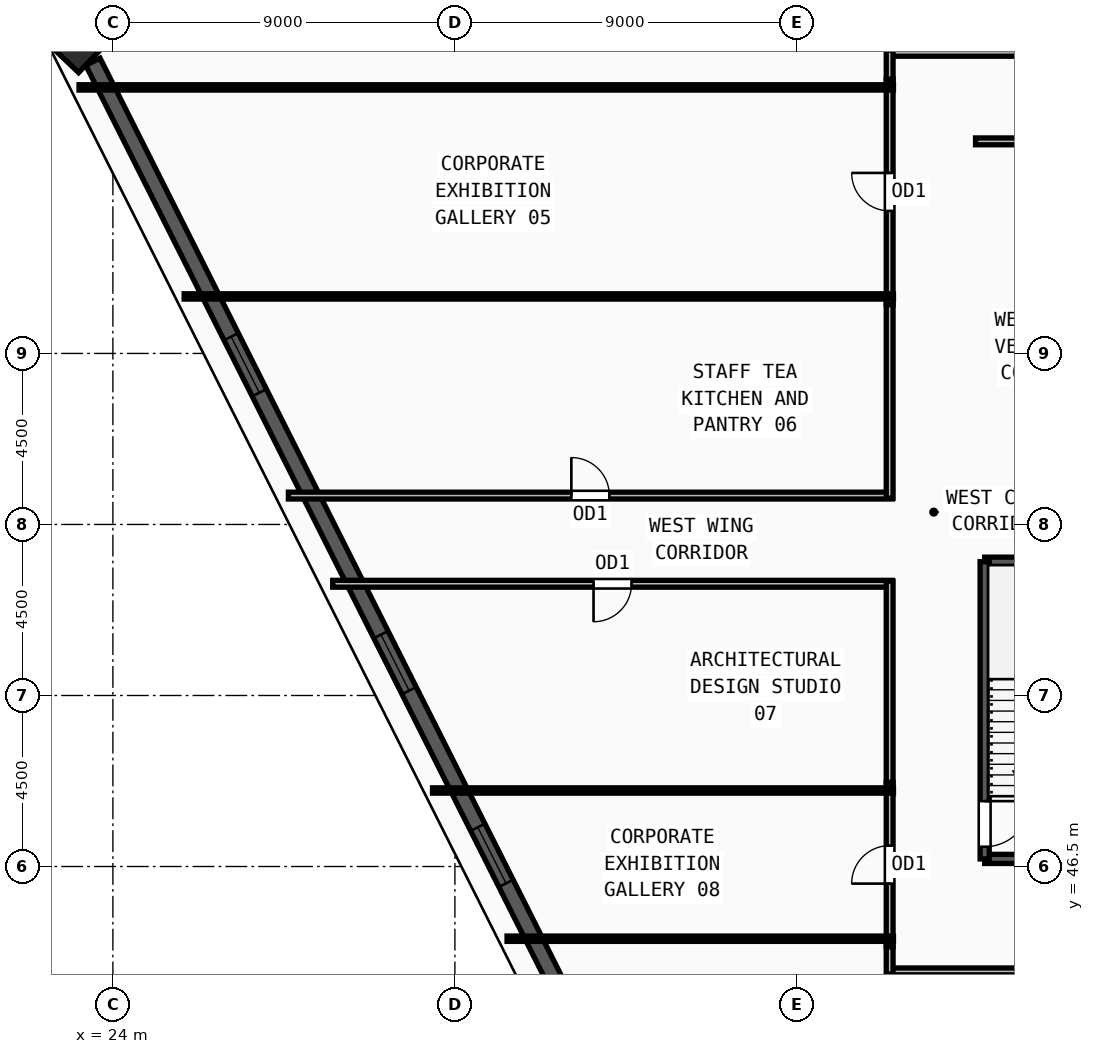
"""IFC4 building model, lengths in metres.
Left out: names, types, materials, properties, quantities, classifications, styles, units other than length and angle.
Written with IfcOpenShell. Run it as: python <this file> out.ifc"""

import sys

from ifc_helpers import new_model, si_unit, direction, frame, frame_2d, origin, origin_2d, place, context, subcontext, project, spatial, rectangle, extrude, source, transform, mapped, element, fill, save


model = new_model("IFC4")
c1 = context("Model", 3, precision=1e-05, world=origin(), true_north=direction((0.0, 1.0)))
c2 = subcontext(c1, "Body", "Model", "MODEL_VIEW")
j1 = project(units=[si_unit("LENGTHUNIT", "METRE"), si_unit("PLANEANGLEUNIT", "RADIAN")], contexts=[c1])
p1 = place(None, origin())
s1 = spatial("IfcSite", under=j1, at=p1, CompositionType="ELEMENT")
p2 = place(p1, origin())
s2 = spatial("IfcBuilding", under=s1, at=p2, CompositionType="ELEMENT")
p3 = place(p2, frame((0.0, 0.0, 102.0)))
s3 = spatial("IfcBuildingStorey", under=s2, at=p3, CompositionType="ELEMENT", Elevation=102.0)
m1 = source(origin(), c2, "Body", "SweptSolid", [
    extrude(rectangle(XDim=1.4, YDim=1.15, at=origin_2d()), origin(), (0.0, 0.0, 1.0), 3.75),
])
p4 = place(p3, frame((23.164, 68.293, 0.0), z_axis=(0.0, 0.0, 1.0), x_axis=(0.68936671806, 0.724412539946, 0.0)))
e1 = element("IfcColumn", 1, at=p4, inside=s3, PredefinedType="COLUMN", context=c2, shape_type="MappedRepresentation", body=[
    mapped(m1, transform((0.0, 0.0, 0.0), x_axis=(1.0, 0.0, 0.0), y_axis=(0.0, 1.0, 0.0), z_axis=(0.0, 0.0, 1.0), scale=1.0)),
])
p5 = place(p3, frame((23.474, 67.677, 0.0), z_axis=(0.0, 0.0, 1.0), x_axis=(0.44918995427, -0.893436279196, 0.0)))
e2 = element("IfcWall", 2, at=p5, inside=s3, PredefinedType="SOLIDWALL", context=c2, shape_type="SweptSolid", body=[
    extrude(rectangle(XDim=32.298, YDim=0.42, at=frame_2d((16.149, 0.0))), origin(), (0.0, 0.0, 1.0), 3.57),
])
m2 = source(origin(), c2, "Body", "SweptSolid", [
    extrude(rectangle(XDim=1.65, YDim=1.95, at=frame_2d((0.825, 0.975))), frame((0.0, 0.22, 0.0), z_axis=(0.0, -1.0, 0.0), x_axis=(1.0, 0.0, 0.0)), (0.0, 0.0, 1.0), 0.44),
])
p6 = place(p5, frame((8.099, 0.0, 0.55)))
e3 = element("IfcOpeningElement", 3, at=p6, cuts=e2, PredefinedType="OPENING", context=c2, shape_type="MappedRepresentation", body=[
    mapped(m2, transform((0.0, 0.0, 0.0), x_axis=(1.0, 0.0, 0.0), y_axis=(0.0, 1.0, 0.0), z_axis=(0.0, 0.0, 1.0), scale=1.0)),
])
p7 = place(p5, frame((16.874, 0.0, 0.55)))
e4 = element("IfcOpeningElement", 4, at=p7, cuts=e2, PredefinedType="OPENING", context=c2, shape_type="MappedRepresentation", body=[
    mapped(m2, transform((0.0, 0.0, 0.0), x_axis=(1.0, 0.0, 0.0), y_axis=(0.0, 1.0, 0.0), z_axis=(0.0, 0.0, 1.0), scale=1.0)),
])
p8 = place(p5, frame((22.548, 0.0, 0.55)))
e5 = element("IfcOpeningElement", 5, at=p8, cuts=e2, PredefinedType="OPENING", context=c2, shape_type="MappedRepresentation", body=[
    mapped(m2, transform((0.0, 0.0, 0.0), x_axis=(1.0, 0.0, 0.0), y_axis=(0.0, 1.0, 0.0), z_axis=(0.0, 0.0, 1.0), scale=1.0)),
])
for number, where, z_axis, x_axis in (
    (6, (46.94, 46.7, 0.0), (0.0, 0.0, 1.0), (1.0, 0.0, 0.0)),
    (7, (50.38, 54.52, 0.0), (0.0, 0.0, 1.0), (-1.0, 0.0, 0.0)),
):
    element("IfcWall", number, at=place(p3, frame(where, z_axis=z_axis, x_axis=x_axis)), inside=s3, PredefinedType="SOLIDWALL", context=c2, shape_type="SweptSolid", body=[
        extrude(rectangle(XDim=3.44, YDim=0.24, at=frame_2d((1.72, 0.0))), origin(), (0.0, 0.0, 1.0), 3.57),
    ])
p9 = place(p3, frame((46.94, 54.52, 0.0), z_axis=(0.0, 0.0, 1.0), x_axis=(0.0, -1.0, 0.0)))
e8 = element("IfcWall", 8, at=p9, inside=s3, PredefinedType="SOLIDWALL", context=c2, shape_type="SweptSolid", body=[
    extrude(rectangle(XDim=7.82, YDim=0.24, at=frame_2d((3.91, 0.0))), origin(), (0.0, 0.0, 1.0), 3.57),
])
m3 = source(origin(), c2, "Body", "SweptSolid", [
    extrude(rectangle(XDim=1.2, YDim=2.2, at=frame_2d((0.6, 1.1))), frame((0.0, 0.13, 0.0), z_axis=(0.0, -1.0, 0.0), x_axis=(1.0, 0.0, 0.0)), (0.0, 0.0, 1.0), 0.26),
])
p10 = place(p9, frame((6.3, 0.0, 0.0)))
e9 = element("IfcOpeningElement", 9, at=p10, cuts=e8, PredefinedType="OPENING", context=c2, shape_type="MappedRepresentation", body=[
    mapped(m3, transform((0.0, 0.0, 0.0), x_axis=(1.0, 0.0, 0.0), y_axis=(0.0, 1.0, 0.0), z_axis=(0.0, 0.0, 1.0), scale=1.0)),
])
p11 = place(p3, frame((46.7, 65.58, 0.0), z_axis=(0.0, 0.0, 1.0), x_axis=(1.0, 0.0, 0.0)))
e10 = element("IfcWall", 10, at=p11, inside=s3, PredefinedType="PARTITIONING", context=c2, shape_type="SweptSolid", body=[
    extrude(rectangle(XDim=3.84, YDim=0.18, at=frame_2d((1.92, 0.0))), origin(), (0.0, 0.0, 1.0), 3.57),
])
m4 = source(origin(), c2, "Body", "SweptSolid", [
    extrude(rectangle(XDim=1.3, YDim=2.2, at=frame_2d((0.65, 1.1))), frame((0.0, 0.1, 0.0), z_axis=(0.0, -1.0, 0.0), x_axis=(1.0, 0.0, 0.0)), (0.0, 0.0, 1.0), 0.2),
])
p12 = place(p11, frame((1.27, 0.0, 0.0)))
e11 = element("IfcOpeningElement", 11, at=p12, cuts=e10, PredefinedType="OPENING", context=c2, shape_type="MappedRepresentation", body=[
    mapped(m4, transform((0.0, 0.0, 0.0), x_axis=(1.0, 0.0, 0.0), y_axis=(0.0, 1.0, 0.0), z_axis=(0.0, 0.0, 1.0), scale=1.0)),
])
p13 = place(p3, frame((44.37, 67.91, 0.0), z_axis=(0.0, 0.0, 1.0), x_axis=(1.0, 0.0, 0.0)))
e12 = element("IfcWall", 12, at=p13, inside=s3, PredefinedType="PARTITIONING", context=c2, shape_type="SweptSolid", body=[
    extrude(rectangle(XDim=10.415, YDim=0.18, at=frame_2d((5.208, 0.0))), origin(), (0.0, 0.0, 1.0), 3.57),
])
m5 = source(origin(), c2, "Body", "SweptSolid", [
    extrude(rectangle(XDim=1.5, YDim=2.2, at=frame_2d((0.75, 1.1))), frame((0.0, 0.1, 0.0), z_axis=(0.0, -1.0, 0.0), x_axis=(1.0, 0.0, 0.0)), (0.0, 0.0, 1.0), 0.2),
])
p14 = place(p13, frame((4.457, 0.0, 0.0)))
e13 = element("IfcOpeningElement", 13, at=p14, cuts=e12, PredefinedType="OPENING", context=c2, shape_type="MappedRepresentation", body=[
    mapped(m5, transform((0.0, 0.0, 0.0), x_axis=(1.0, 0.0, 0.0), y_axis=(0.0, 1.0, 0.0), z_axis=(0.0, 0.0, 1.0), scale=1.0)),
])
p15 = place(p3, frame((44.44, 61.285, 0.0), z_axis=(0.0, 0.0, 1.0), x_axis=(0.0, 1.0, 0.0)))
e14 = element("IfcWall", 14, at=p15, inside=s3, PredefinedType="PARTITIONING", context=c2, shape_type="SweptSolid", body=[
    extrude(rectangle(XDim=5.93, YDim=0.18, at=frame_2d((2.965, 0.0))), origin(), (0.0, 0.0, 1.0), 3.57),
])
m6 = source(origin(), c2, "Body", "SweptSolid", [
    extrude(rectangle(XDim=1.0, YDim=2.2, at=frame_2d((0.5, 1.1))), frame((0.0, 0.1, 0.0), z_axis=(0.0, -1.0, 0.0), x_axis=(1.0, 0.0, 0.0)), (0.0, 0.0, 1.0), 0.2),
])
p16 = place(p15, frame((2.465, 0.0, 0.0)))
e15 = element("IfcOpeningElement", 15, at=p16, cuts=e14, PredefinedType="OPENING", context=c2, shape_type="MappedRepresentation", body=[
    mapped(m6, transform((0.0, 0.0, 0.0), x_axis=(1.0, 0.0, 0.0), y_axis=(0.0, 1.0, 0.0), z_axis=(0.0, 0.0, 1.0), scale=1.0)),
])
p17 = place(p3, frame((28.618, 56.26, 0.0), z_axis=(0.0, 0.0, 1.0), x_axis=(1.0, 0.0, 0.0)))
e16 = element("IfcWall", 16, at=p17, inside=s3, PredefinedType="PARTITIONING", context=c2, shape_type="SweptSolid", body=[
    extrude(rectangle(XDim=15.892, YDim=0.18, at=frame_2d((7.946, 0.0))), origin(), (0.0, 0.0, 1.0), 3.57),
])
p18 = place(p17, frame((7.446, 0.0, 0.0)))
e17 = element("IfcOpeningElement", 17, at=p18, cuts=e16, PredefinedType="OPENING", context=c2, shape_type="MappedRepresentation", body=[
    mapped(m6, transform((0.0, 0.0, 0.0), x_axis=(1.0, 0.0, 0.0), y_axis=(0.0, 1.0, 0.0), z_axis=(0.0, 0.0, 1.0), scale=1.0)),
])
p19 = place(p3, frame((44.51, 53.94, 0.0), z_axis=(0.0, 0.0, 1.0), x_axis=(-1.0, 0.0, 0.0)))
e18 = element("IfcWall", 18, at=p19, inside=s3, PredefinedType="PARTITIONING", context=c2, shape_type="SweptSolid", body=[
    extrude(rectangle(XDim=14.725, YDim=0.18, at=frame_2d((7.363, 0.0))), origin(), (0.0, 0.0, 1.0), 3.57),
])
p20 = place(p19, frame((6.862, 0.0, 0.0)))
e19 = element("IfcOpeningElement", 19, at=p20, cuts=e18, PredefinedType="OPENING", context=c2, shape_type="MappedRepresentation", body=[
    mapped(m6, transform((0.0, 0.0, 0.0), x_axis=(1.0, 0.0, 0.0), y_axis=(0.0, 1.0, 0.0), z_axis=(0.0, 0.0, 1.0), scale=1.0)),
])
p21 = place(p3, frame((44.44, 44.385, 0.0), z_axis=(0.0, 0.0, 1.0), x_axis=(0.0, 1.0, 0.0)))
e20 = element("IfcWall", 20, at=p21, inside=s3, PredefinedType="PARTITIONING", context=c2, shape_type="SweptSolid", body=[
    extrude(rectangle(XDim=4.33, YDim=0.18, at=frame_2d((2.165, 0.0))), origin(), (0.0, 0.0, 1.0), 3.57),
])
p22 = place(p21, frame((1.665, 0.0, 0.0)))
e21 = element("IfcOpeningElement", 21, at=p22, cuts=e20, PredefinedType="OPENING", context=c2, shape_type="MappedRepresentation", body=[
    mapped(m6, transform((0.0, 0.0, 0.0), x_axis=(1.0, 0.0, 0.0), y_axis=(0.0, 1.0, 0.0), z_axis=(0.0, 0.0, 1.0), scale=1.0)),
])
p23 = place(p3, frame((53.715, 43.74, 0.0), z_axis=(0.0, 0.0, 1.0), x_axis=(-1.0, 0.0, 0.0)))
e22 = element("IfcWall", 22, at=p23, inside=s3, PredefinedType="PARTITIONING", context=c2, shape_type="SweptSolid", body=[
    extrude(rectangle(XDim=9.345, YDim=0.18, at=frame_2d((4.672, 0.0))), origin(), (0.0, 0.0, 1.0), 3.57),
])
p24 = place(p23, frame((3.923, 0.0, 0.0)))
e23 = element("IfcOpeningElement", 23, at=p24, cuts=e22, PredefinedType="OPENING", context=c2, shape_type="MappedRepresentation", body=[
    mapped(m5, transform((0.0, 0.0, 0.0), x_axis=(1.0, 0.0, 0.0), y_axis=(0.0, 1.0, 0.0), z_axis=(0.0, 0.0, 1.0), scale=1.0)),
])
p25 = place(p3, frame((44.44, 67.215, 0.0), z_axis=(0.0, 0.0, 1.0), x_axis=(0.0, 1.0, 0.0)))
e24 = element("IfcWall", 24, at=p25, inside=s3, PredefinedType="PARTITIONING", context=c2, shape_type="SweptSolid", body=[
    extrude(rectangle(XDim=0.765, YDim=0.18, at=frame_2d((0.382, 0.0))), origin(), (0.0, 0.0, 1.0), 3.57),
])
p26 = place(p3, frame((44.44, 56.19, 0.0), z_axis=(0.0, 0.0, 1.0), x_axis=(0.0, 1.0, 0.0)))
e25 = element("IfcWall", 25, at=p26, inside=s3, PredefinedType="PARTITIONING", context=c2, shape_type="SweptSolid", body=[
    extrude(rectangle(XDim=5.095, YDim=0.18, at=frame_2d((2.547, 0.0))), origin(), (0.0, 0.0, 1.0), 3.57),
])
p27 = place(p3, frame((44.44, 48.715, 0.0), z_axis=(0.0, 0.0, 1.0), x_axis=(0.0, 1.0, 0.0)))
e26 = element("IfcWall", 26, at=p27, inside=s3, PredefinedType="PARTITIONING", context=c2, shape_type="SweptSolid", body=[
    extrude(rectangle(XDim=5.295, YDim=0.18, at=frame_2d((2.647, 0.0))), origin(), (0.0, 0.0, 1.0), 3.57),
])
p28 = place(p3, frame((44.44, 43.67, 0.0), z_axis=(0.0, 0.0, 1.0), x_axis=(0.0, 1.0, 0.0)))
e27 = element("IfcWall", 27, at=p28, inside=s3, PredefinedType="PARTITIONING", context=c2, shape_type="SweptSolid", body=[
    extrude(rectangle(XDim=0.715, YDim=0.18, at=frame_2d((0.357, 0.0))), origin(), (0.0, 0.0, 1.0), 3.57),
])
p29 = place(p3, frame((44.54, 44.6, 0.0), z_axis=(0.0, 0.0, 1.0), x_axis=(-1.0, 0.0, 0.0)))
e28 = element("IfcWall", 28, at=p29, inside=s3, PredefinedType="PARTITIONING", context=c2, shape_type="SweptSolid", body=[
    extrude(rectangle(XDim=10.168, YDim=0.14, at=frame_2d((5.084, 0.0))), origin(), (0.0, 0.0, 1.0), 3.57),
])
p30 = place(p3, frame((44.54, 48.5, 0.0), z_axis=(0.0, 0.0, 1.0), x_axis=(-1.0, 0.0, 0.0)))
e29 = element("IfcWall", 29, at=p30, inside=s3, PredefinedType="PARTITIONING", context=c2, shape_type="SweptSolid", body=[
    extrude(rectangle(XDim=12.129, YDim=0.14, at=frame_2d((6.064, 0.0))), origin(), (0.0, 0.0, 1.0), 3.57),
])
p31 = place(p3, frame((44.54, 61.5, 0.0), z_axis=(0.0, 0.0, 1.0), x_axis=(-1.0, 0.0, 0.0)))
e30 = element("IfcWall", 30, at=p31, inside=s3, PredefinedType="PARTITIONING", context=c2, shape_type="SweptSolid", body=[
    extrude(rectangle(XDim=18.665, YDim=0.14, at=frame_2d((9.333, 0.0))), origin(), (0.0, 0.0, 1.0), 3.57),
])
p32 = place(p3, frame((44.54, 67.0, 0.0), z_axis=(0.0, 0.0, 1.0), x_axis=(-1.0, 0.0, 0.0)))
e31 = element("IfcWall", 31, at=p32, inside=s3, PredefinedType="PARTITIONING", context=c2, shape_type="SweptSolid", body=[
    extrude(rectangle(XDim=21.431, YDim=0.14, at=frame_2d((10.716, 0.0))), origin(), (0.0, 0.0, 1.0), 2.755),
])
m7 = source(origin(), c2, "Body", "SweptSolid", [
    extrude(rectangle(XDim=1.65, YDim=1.95, at=frame_2d((0.825, 0.975))), frame((0.0, 0.03, 0.0), z_axis=(0.0, -1.0, 0.0), x_axis=(1.0, 0.0, 0.0)), (0.0, 0.0, 1.0), 0.06),
])
p33 = place(p6, origin())
e32 = element("IfcWindow", 32, at=p33, inside=s3, PartitioningType="DOUBLE_PANEL_VERTICAL", PredefinedType="WINDOW", context=c2, shape_type="MappedRepresentation", body=[
    mapped(m7, transform((0.0, 0.0, 0.0), x_axis=(1.0, 0.0, 0.0), y_axis=(0.0, 1.0, 0.0), z_axis=(0.0, 0.0, 1.0), scale=1.0)),
])
fill(e3, e32)
p34 = place(p7, origin())
e33 = element("IfcWindow", 33, at=p34, inside=s3, PartitioningType="DOUBLE_PANEL_VERTICAL", PredefinedType="WINDOW", context=c2, shape_type="MappedRepresentation", body=[
    mapped(m7, transform((0.0, 0.0, 0.0), x_axis=(1.0, 0.0, 0.0), y_axis=(0.0, 1.0, 0.0), z_axis=(0.0, 0.0, 1.0), scale=1.0)),
])
fill(e4, e33)
p35 = place(p8, origin())
e34 = element("IfcWindow", 34, at=p35, inside=s3, PartitioningType="DOUBLE_PANEL_VERTICAL", PredefinedType="WINDOW", context=c2, shape_type="MappedRepresentation", body=[
    mapped(m7, transform((0.0, 0.0, 0.0), x_axis=(1.0, 0.0, 0.0), y_axis=(0.0, 1.0, 0.0), z_axis=(0.0, 0.0, 1.0), scale=1.0)),
])
fill(e5, e34)
m8 = source(origin(), c2, "Body", "SweptSolid", [
    extrude(rectangle(XDim=1.2, YDim=2.2, at=frame_2d((0.6, 1.1))), frame((0.0, 0.025, 0.0), z_axis=(0.0, -1.0, 0.0), x_axis=(1.0, 0.0, 0.0)), (0.0, 0.0, 1.0), 0.05),
])
p36 = place(p10, origin())
e35 = element("IfcDoor", 35, at=p36, inside=s3, OperationType="SINGLE_SWING_LEFT", PredefinedType="DOOR", context=c2, shape_type="MappedRepresentation", body=[
    mapped(m8, transform((0.0, 0.0, 0.0), x_axis=(1.0, 0.0, 0.0), y_axis=(0.0, 1.0, 0.0), z_axis=(0.0, 0.0, 1.0), scale=1.0)),
])
fill(e9, e35)
m9 = source(origin(), c2, "Body", "SweptSolid", [
    extrude(rectangle(XDim=1.0, YDim=2.2, at=frame_2d((0.5, 1.1))), frame((0.0, 0.025, 0.0), z_axis=(0.0, -1.0, 0.0), x_axis=(1.0, 0.0, 0.0)), (0.0, 0.0, 1.0), 0.05),
])
p37 = place(p16, origin())
e36 = element("IfcDoor", 36, at=p37, inside=s3, OperationType="SINGLE_SWING_RIGHT", PredefinedType="DOOR", context=c2, shape_type="MappedRepresentation", body=[
    mapped(m9, transform((0.0, 0.0, 0.0), x_axis=(1.0, 0.0, 0.0), y_axis=(0.0, 1.0, 0.0), z_axis=(0.0, 0.0, 1.0), scale=1.0)),
])
fill(e15, e36)
p38 = place(p18, origin())
e37 = element("IfcDoor", 37, at=p38, inside=s3, OperationType="SINGLE_SWING_LEFT", PredefinedType="DOOR", context=c2, shape_type="MappedRepresentation", body=[
    mapped(m9, transform((0.0, 0.0, 0.0), x_axis=(1.0, 0.0, 0.0), y_axis=(0.0, 1.0, 0.0), z_axis=(0.0, 0.0, 1.0), scale=1.0)),
])
fill(e17, e37)
p39 = place(p20, origin())
e38 = element("IfcDoor", 38, at=p39, inside=s3, OperationType="SINGLE_SWING_RIGHT", PredefinedType="DOOR", context=c2, shape_type="MappedRepresentation", body=[
    mapped(m9, transform((0.0, 0.0, 0.0), x_axis=(1.0, 0.0, 0.0), y_axis=(0.0, 1.0, 0.0), z_axis=(0.0, 0.0, 1.0), scale=1.0)),
])
fill(e19, e38)
p40 = place(p22, origin())
e39 = element("IfcDoor", 39, at=p40, inside=s3, OperationType="SINGLE_SWING_LEFT", PredefinedType="DOOR", context=c2, shape_type="MappedRepresentation", body=[
    mapped(m9, transform((0.0, 0.0, 0.0), x_axis=(1.0, 0.0, 0.0), y_axis=(0.0, 1.0, 0.0), z_axis=(0.0, 0.0, 1.0), scale=1.0)),
])
fill(e21, e39)
save(model, sys.argv[1])
